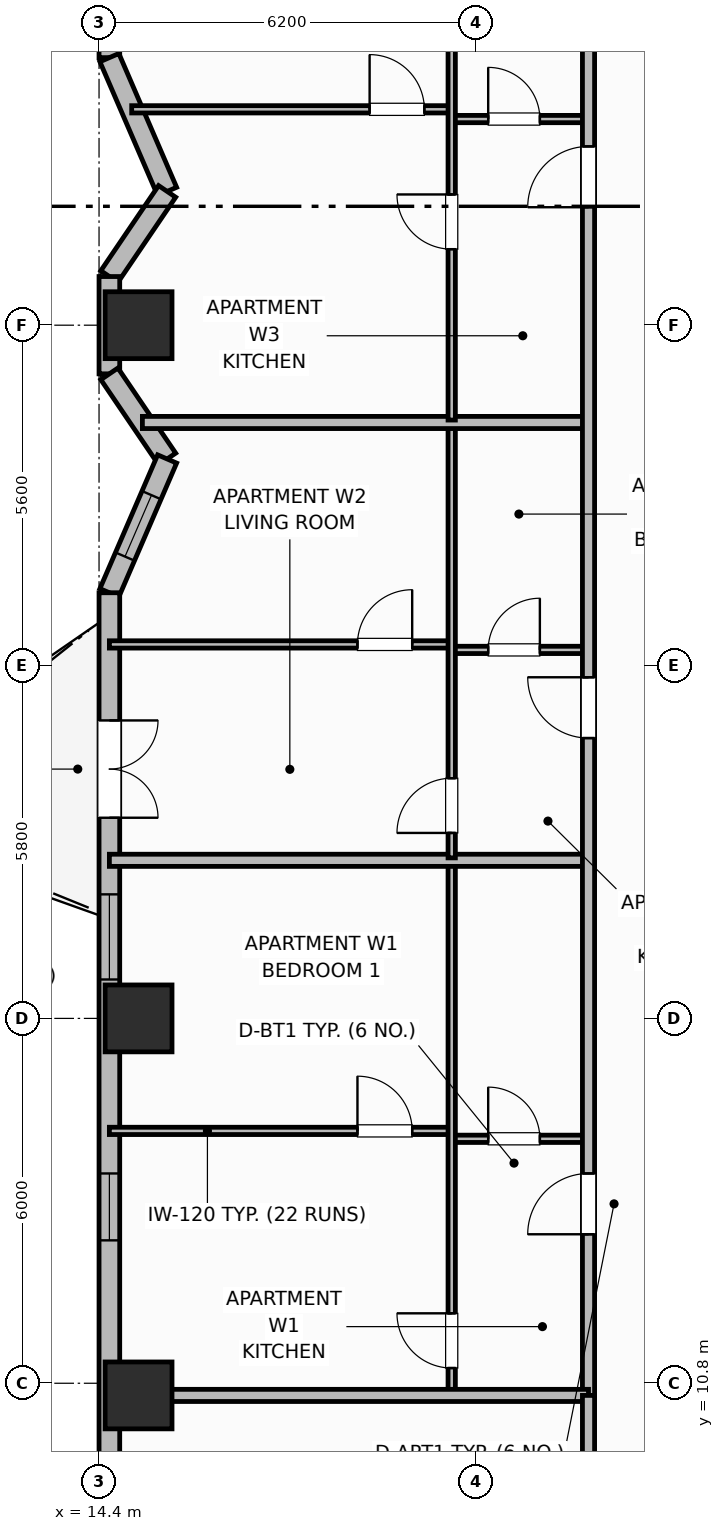
"""IFC4 building model, lengths in metres.
Left out: names, types, materials, properties, quantities, classifications, styles, units other than length and angle.
Written with IfcOpenShell. Run it as: python <this file> out.ifc"""

import sys

from ifc_helpers import new_model, si_unit, direction, frame, frame_2d, origin, origin_2d, place, context, subcontext, project, spatial, rectangle, extrude, element, fill, save


model = new_model("IFC4")
c1 = context("Model", 3, precision=1e-05, world=origin(), true_north=direction((0.0, 1.0)))
c2 = subcontext(c1, "Body", "Model", "MODEL_VIEW")
j1 = project(units=[si_unit("LENGTHUNIT", "METRE"), si_unit("PLANEANGLEUNIT", "RADIAN")], contexts=[c1])
p1 = place(None, origin())
s1 = spatial("IfcSite", under=j1, at=p1, CompositionType="ELEMENT")
p2 = place(p1, origin())
s2 = spatial("IfcBuilding", under=s1, at=p2, CompositionType="ELEMENT")
p3 = place(p2, frame((0.0, 0.0, 95.7)))
s3 = spatial("IfcBuildingStorey", under=s2, at=p3, CompositionType="ELEMENT", Elevation=95.7)
for number, where, z_axis, x_axis in (
    (1, (15.05, 10.6, 0.0), (0.0, 0.0, 1.0), (1.0, 0.0, 0.0)),
    (2, (15.05, 16.8, 0.0), (0.0, 0.0, 1.0), (1.0, 0.0, 0.0)),
    (3, (15.05, 28.2, 0.0), (0.0, 0.0, 1.0), (1.0, 0.0, 0.0)),
):
    element("IfcColumn", number, at=place(p3, frame(where, z_axis=z_axis, x_axis=x_axis)), inside=s3, PredefinedType="COLUMN", context=c2, shape_type="SweptSolid", body=[
        extrude(rectangle(XDim=1.1, YDim=1.1, at=origin_2d()), origin(), (0.0, 0.0, 1.0), 3.7),
    ])
p4 = place(p3, frame((14.57, 47.4, 0.0), z_axis=(0.0, 0.0, 1.0), x_axis=(0.0, -1.0, 0.0)))
e4 = element("IfcWall", 4, at=p4, inside=s3, PredefinedType="SOLIDWALL", context=c2, shape_type="SweptSolid", body=[
    extrude(rectangle(XDim=14.8, YDim=0.34, at=frame_2d((7.4, 0.0))), origin(), (0.0, 0.0, 1.0), 2.7),
])
p5 = place(p4, frame((3.962, 0.0, 0.73)))
e5 = element("IfcOpeningElement", 5, at=p5, cuts=e4, PredefinedType="OPENING", context=c2, shape_type="SweptSolid", body=[
    extrude(rectangle(XDim=1.4, YDim=1.85, at=frame_2d((0.7, 0.925))), frame((0.0, 0.18, 0.0), z_axis=(0.0, -1.0, 0.0), x_axis=(1.0, 0.0, 0.0)), (0.0, 0.0, 1.0), 0.36),
])
p6 = place(p4, frame((11.762, 0.0, 0.73)))
e6 = element("IfcOpeningElement", 6, at=p6, cuts=e4, PredefinedType="OPENING", context=c2, shape_type="SweptSolid", body=[
    extrude(rectangle(XDim=1.4, YDim=1.85, at=frame_2d((0.7, 0.925))), frame((0.0, 0.18, 0.0), z_axis=(0.0, -1.0, 0.0), x_axis=(1.0, 0.0, 0.0)), (0.0, 0.0, 1.0), 0.36),
])
p7 = place(p3, frame((14.57, 32.6, 0.0), z_axis=(0.0, 0.0, 1.0), x_axis=(0.396389181543, -0.918082576218, 0.0)))
e7 = element("IfcWall", 7, at=p7, inside=s3, PredefinedType="SOLIDWALL", context=c2, shape_type="SweptSolid", body=[
    extrude(rectangle(XDim=2.396, YDim=0.34, at=frame_2d((1.198, 0.0))), origin(), (0.0, 0.0, 1.0), 2.7),
])
p8 = place(p3, frame((15.52, 30.4, 0.0), z_axis=(0.0, 0.0, 1.0), x_axis=(-0.561508476251, -0.827470985049, 0.0)))
e8 = element("IfcWall", 8, at=p8, inside=s3, PredefinedType="SOLIDWALL", context=c2, shape_type="SweptSolid", body=[
    extrude(rectangle(XDim=1.692, YDim=0.34, at=frame_2d((0.846, 0.0))), origin(), (0.0, 0.0, 1.0), 2.7),
])
p9 = place(p3, frame((14.57, 29.0, 0.0), z_axis=(0.0, 0.0, 1.0), x_axis=(0.0, -1.0, 0.0)))
e9 = element("IfcWall", 9, at=p9, inside=s3, PredefinedType="SOLIDWALL", context=c2, shape_type="SweptSolid", body=[
    extrude(rectangle(XDim=1.6, YDim=0.34, at=frame_2d((0.8, 0.0))), origin(), (0.0, 0.0, 1.0), 2.7),
])
p10 = place(p3, frame((14.57, 27.4, 0.0), z_axis=(0.0, 0.0, 1.0), x_axis=(0.561508476251, -0.827470985049, 0.0)))
e10 = element("IfcWall", 10, at=p10, inside=s3, PredefinedType="SOLIDWALL", context=c2, shape_type="SweptSolid", body=[
    extrude(rectangle(XDim=1.692, YDim=0.34, at=frame_2d((0.846, 0.0))), origin(), (0.0, 0.0, 1.0), 2.7),
])
p11 = place(p3, frame((15.52, 26.0, 0.0), z_axis=(0.0, 0.0, 1.0), x_axis=(-0.396426258231, -0.918066567186, 0.0)))
e11 = element("IfcWall", 11, at=p11, inside=s3, PredefinedType="SOLIDWALL", context=c2, shape_type="SweptSolid", body=[
    extrude(rectangle(XDim=2.396, YDim=0.34, at=frame_2d((1.198, 0.0))), origin(), (0.0, 0.0, 1.0), 2.7),
])
p12 = place(p11, frame((0.648, 0.0, 0.89)))
e12 = element("IfcOpeningElement", 12, at=p12, cuts=e11, PredefinedType="OPENING", context=c2, shape_type="SweptSolid", body=[
    extrude(rectangle(XDim=1.1, YDim=1.65, at=frame_2d((0.55, 0.825))), frame((0.0, 0.18, 0.0), z_axis=(0.0, -1.0, 0.0), x_axis=(1.0, 0.0, 0.0)), (0.0, 0.0, 1.0), 0.36),
])
p13 = place(p3, frame((14.57, 23.8, 0.0), z_axis=(0.0, 0.0, 1.0), x_axis=(0.0, -1.0, 0.0)))
e13 = element("IfcWall", 13, at=p13, inside=s3, PredefinedType="SOLIDWALL", context=c2, shape_type="SweptSolid", body=[
    extrude(rectangle(XDim=14.8, YDim=0.34, at=frame_2d((7.4, 0.0))), origin(), (0.0, 0.0, 1.0), 2.7),
])
p14 = place(p13, frame((2.1, 0.0, 0.0)))
e14 = element("IfcOpeningElement", 14, at=p14, cuts=e13, PredefinedType="OPENING", context=c2, shape_type="SweptSolid", body=[
    extrude(rectangle(XDim=1.6, YDim=2.1, at=frame_2d((0.8, 1.05))), frame((0.0, 0.18, 0.0), z_axis=(0.0, -1.0, 0.0), x_axis=(1.0, 0.0, 0.0)), (0.0, 0.0, 1.0), 0.36),
])
p15 = place(p13, frame((4.96, 0.0, 0.69)))
e15 = element("IfcOpeningElement", 15, at=p15, cuts=e13, PredefinedType="OPENING", context=c2, shape_type="SweptSolid", body=[
    extrude(rectangle(XDim=1.4, YDim=1.85, at=frame_2d((0.7, 0.925))), frame((0.0, 0.18, 0.0), z_axis=(0.0, -1.0, 0.0), x_axis=(1.0, 0.0, 0.0)), (0.0, 0.0, 1.0), 0.36),
])
p16 = place(p13, frame((9.55, 0.0, 0.93)))
e16 = element("IfcOpeningElement", 16, at=p16, cuts=e13, PredefinedType="OPENING", context=c2, shape_type="SweptSolid", body=[
    extrude(rectangle(XDim=1.1, YDim=1.65, at=frame_2d((0.55, 0.825))), frame((0.0, 0.18, 0.0), z_axis=(0.0, -1.0, 0.0), x_axis=(1.0, 0.0, 0.0)), (0.0, 0.0, 1.0), 0.36),
])
p17 = place(p3, frame((20.2, 14.82, 0.0), z_axis=(0.0, 0.0, 1.0), x_axis=(1.0, 0.0, 0.0)))
e17 = element("IfcWall", 17, at=p17, inside=s3, PredefinedType="PARTITIONING", context=c2, shape_type="SweptSolid", body=[
    extrude(rectangle(XDim=2.25, YDim=0.12, at=frame_2d((1.125, 0.0))), origin(), (0.0, 0.0, 1.0), 2.53),
])
p18 = place(p17, frame((0.6, 0.0, 0.0)))
e18 = element("IfcOpeningElement", 18, at=p18, cuts=e17, PredefinedType="OPENING", context=c2, shape_type="SweptSolid", body=[
    extrude(rectangle(XDim=0.85, YDim=2.1, at=frame_2d((0.425, 1.05))), frame((0.0, 0.07, 0.0), z_axis=(0.0, -1.0, 0.0), x_axis=(1.0, 0.0, 0.0)), (0.0, 0.0, 1.0), 0.14),
])
p19 = place(p3, frame((14.57, 14.95, 0.0), z_axis=(0.0, 0.0, 1.0), x_axis=(1.0, 0.0, 0.0)))
e19 = element("IfcWall", 19, at=p19, inside=s3, PredefinedType="PARTITIONING", context=c2, shape_type="SweptSolid", body=[
    extrude(rectangle(XDim=5.63, YDim=0.12, at=frame_2d((2.815, 0.0))), origin(), (0.0, 0.0, 1.0), 2.53),
])
p20 = place(p19, frame((4.08, 0.0, 0.0)))
e20 = element("IfcOpeningElement", 20, at=p20, cuts=e19, PredefinedType="OPENING", context=c2, shape_type="SweptSolid", body=[
    extrude(rectangle(XDim=0.9, YDim=2.1, at=frame_2d((0.45, 1.05))), frame((0.0, 0.07, 0.0), z_axis=(0.0, -1.0, 0.0), x_axis=(1.0, 0.0, 0.0)), (0.0, 0.0, 1.0), 0.14),
])
p21 = place(p3, frame((20.2, 10.64, 0.0), z_axis=(0.0, 0.0, 1.0), x_axis=(0.0, 1.0, 0.0)))
e21 = element("IfcWall", 21, at=p21, inside=s3, PredefinedType="PARTITIONING", context=c2, shape_type="SweptSolid", body=[
    extrude(rectangle(XDim=8.72, YDim=0.12, at=frame_2d((4.36, 0.0))), origin(), (0.0, 0.0, 1.0), 2.53),
])
p22 = place(p21, frame((0.41, 0.0, 0.0)))
e22 = element("IfcOpeningElement", 22, at=p22, cuts=e21, PredefinedType="OPENING", context=c2, shape_type="SweptSolid", body=[
    extrude(rectangle(XDim=0.9, YDim=2.1, at=frame_2d((0.45, 1.05))), frame((0.0, 0.07, 0.0), z_axis=(0.0, -1.0, 0.0), x_axis=(1.0, 0.0, 0.0)), (0.0, 0.0, 1.0), 0.14),
])
p23 = place(p3, frame((14.57, 19.4, 0.0), z_axis=(0.0, 0.0, 1.0), x_axis=(1.0, 0.0, 0.0)))
e23 = element("IfcWall", 23, at=p23, inside=s3, PredefinedType="PARTITIONING", context=c2, shape_type="SweptSolid", body=[
    extrude(rectangle(XDim=7.88, YDim=0.2, at=frame_2d((3.94, 0.0))), origin(), (0.0, 0.0, 1.0), 2.53),
])
p24 = place(p3, frame((20.2, 22.86, 0.0), z_axis=(0.0, 0.0, 1.0), x_axis=(1.0, 0.0, 0.0)))
e24 = element("IfcWall", 24, at=p24, inside=s3, PredefinedType="PARTITIONING", context=c2, shape_type="SweptSolid", body=[
    extrude(rectangle(XDim=2.25, YDim=0.12, at=frame_2d((1.125, 0.0))), origin(), (0.0, 0.0, 1.0), 2.53),
])
p25 = place(p24, frame((0.6, 0.0, 0.0)))
e25 = element("IfcOpeningElement", 25, at=p25, cuts=e24, PredefinedType="OPENING", context=c2, shape_type="SweptSolid", body=[
    extrude(rectangle(XDim=0.85, YDim=2.1, at=frame_2d((0.425, 1.05))), frame((0.0, 0.07, 0.0), z_axis=(0.0, -1.0, 0.0), x_axis=(1.0, 0.0, 0.0)), (0.0, 0.0, 1.0), 0.14),
])
p26 = place(p3, frame((14.57, 22.95, 0.0), z_axis=(0.0, 0.0, 1.0), x_axis=(1.0, 0.0, 0.0)))
e26 = element("IfcWall", 26, at=p26, inside=s3, PredefinedType="PARTITIONING", context=c2, shape_type="SweptSolid", body=[
    extrude(rectangle(XDim=5.63, YDim=0.12, at=frame_2d((2.815, 0.0))), origin(), (0.0, 0.0, 1.0), 2.53),
])
p27 = place(p26, frame((4.08, 0.0, 0.0)))
e27 = element("IfcOpeningElement", 27, at=p27, cuts=e26, PredefinedType="OPENING", context=c2, shape_type="SweptSolid", body=[
    extrude(rectangle(XDim=0.9, YDim=2.1, at=frame_2d((0.45, 1.05))), frame((0.0, 0.07, 0.0), z_axis=(0.0, -1.0, 0.0), x_axis=(1.0, 0.0, 0.0)), (0.0, 0.0, 1.0), 0.14),
])
p28 = place(p3, frame((20.2, 19.44, 0.0), z_axis=(0.0, 0.0, 1.0), x_axis=(0.0, 1.0, 0.0)))
e28 = element("IfcWall", 28, at=p28, inside=s3, PredefinedType="PARTITIONING", context=c2, shape_type="SweptSolid", body=[
    extrude(rectangle(XDim=7.12, YDim=0.12, at=frame_2d((3.56, 0.0))), origin(), (0.0, 0.0, 1.0), 2.53),
])
p29 = place(p28, frame((0.41, 0.0, 0.0)))
e29 = element("IfcOpeningElement", 29, at=p29, cuts=e28, PredefinedType="OPENING", context=c2, shape_type="SweptSolid", body=[
    extrude(rectangle(XDim=0.9, YDim=2.1, at=frame_2d((0.45, 1.05))), frame((0.0, 0.07, 0.0), z_axis=(0.0, -1.0, 0.0), x_axis=(1.0, 0.0, 0.0)), (0.0, 0.0, 1.0), 0.14),
])
p30 = place(p3, frame((15.113, 26.6, 0.0), z_axis=(0.0, 0.0, 1.0), x_axis=(1.0, 0.0, 0.0)))
e30 = element("IfcWall", 30, at=p30, inside=s3, PredefinedType="PARTITIONING", context=c2, shape_type="SweptSolid", body=[
    extrude(rectangle(XDim=7.337, YDim=0.2, at=frame_2d((3.668, 0.0))), origin(), (0.0, 0.0, 1.0), 2.53),
])
p31 = place(p3, frame((20.2, 31.59, 0.0), z_axis=(0.0, 0.0, 1.0), x_axis=(1.0, 0.0, 0.0)))
e31 = element("IfcWall", 31, at=p31, inside=s3, PredefinedType="PARTITIONING", context=c2, shape_type="SweptSolid", body=[
    extrude(rectangle(XDim=2.25, YDim=0.12, at=frame_2d((1.125, 0.0))), origin(), (0.0, 0.0, 1.0), 2.53),
])
p32 = place(p31, frame((0.6, 0.0, 0.0)))
e32 = element("IfcOpeningElement", 32, at=p32, cuts=e31, PredefinedType="OPENING", context=c2, shape_type="SweptSolid", body=[
    extrude(rectangle(XDim=0.85, YDim=2.1, at=frame_2d((0.425, 1.05))), frame((0.0, 0.07, 0.0), z_axis=(0.0, -1.0, 0.0), x_axis=(1.0, 0.0, 0.0)), (0.0, 0.0, 1.0), 0.14),
])
p33 = place(p3, frame((14.937, 31.75, 0.0), z_axis=(0.0, 0.0, 1.0), x_axis=(1.0, 0.0, 0.0)))
e33 = element("IfcWall", 33, at=p33, inside=s3, PredefinedType="PARTITIONING", context=c2, shape_type="SweptSolid", body=[
    extrude(rectangle(XDim=5.263, YDim=0.12, at=frame_2d((2.631, 0.0))), origin(), (0.0, 0.0, 1.0), 2.53),
])
p34 = place(p33, frame((3.913, 0.0, 0.0)))
e34 = element("IfcOpeningElement", 34, at=p34, cuts=e33, PredefinedType="OPENING", context=c2, shape_type="SweptSolid", body=[
    extrude(rectangle(XDim=0.9, YDim=2.1, at=frame_2d((0.45, 1.05))), frame((0.0, 0.07, 0.0), z_axis=(0.0, -1.0, 0.0), x_axis=(1.0, 0.0, 0.0)), (0.0, 0.0, 1.0), 0.14),
])
p35 = place(p3, frame((20.2, 26.64, 0.0), z_axis=(0.0, 0.0, 1.0), x_axis=(0.0, 1.0, 0.0)))
e35 = element("IfcWall", 35, at=p35, inside=s3, PredefinedType="PARTITIONING", context=c2, shape_type="SweptSolid", body=[
    extrude(rectangle(XDim=10.32, YDim=0.12, at=frame_2d((5.16, 0.0))), origin(), (0.0, 0.0, 1.0), 2.53),
])
p36 = place(p35, frame((2.81, 0.0, 0.0)))
e36 = element("IfcOpeningElement", 36, at=p36, cuts=e35, PredefinedType="OPENING", context=c2, shape_type="SweptSolid", body=[
    extrude(rectangle(XDim=0.9, YDim=2.1, at=frame_2d((0.45, 1.05))), frame((0.0, 0.07, 0.0), z_axis=(0.0, -1.0, 0.0), x_axis=(1.0, 0.0, 0.0)), (0.0, 0.0, 1.0), 0.14),
])
p37 = place(p3, frame((22.45, 10.6, 0.0), z_axis=(0.0, 0.0, 1.0), x_axis=(0.0, 1.0, 0.0)))
e37 = element("IfcWall", 37, at=p37, inside=s3, PredefinedType="PARTITIONING", context=c2, shape_type="SweptSolid", body=[
    extrude(rectangle(XDim=35.2, YDim=0.2, at=frame_2d((17.6, 0.0))), origin(), (0.0, 0.0, 1.0), 2.53),
])
p38 = place(p37, frame((2.65, 0.0, 0.0)))
e38 = element("IfcOpeningElement", 38, at=p38, cuts=e37, PredefinedType="OPENING", context=c2, shape_type="SweptSolid", body=[
    extrude(rectangle(XDim=1.0, YDim=2.15, at=frame_2d((0.5, 1.075))), frame((0.0, 0.11, 0.0), z_axis=(0.0, -1.0, 0.0), x_axis=(1.0, 0.0, 0.0)), (0.0, 0.0, 1.0), 0.22),
])
p39 = place(p37, frame((10.81, 0.0, 0.0)))
e39 = element("IfcOpeningElement", 39, at=p39, cuts=e37, PredefinedType="OPENING", context=c2, shape_type="SweptSolid", body=[
    extrude(rectangle(XDim=1.0, YDim=2.15, at=frame_2d((0.5, 1.075))), frame((0.0, 0.11, 0.0), z_axis=(0.0, -1.0, 0.0), x_axis=(1.0, 0.0, 0.0)), (0.0, 0.0, 1.0), 0.22),
])
p40 = place(p37, frame((19.54, 0.0, 0.0)))
e40 = element("IfcOpeningElement", 40, at=p40, cuts=e37, PredefinedType="OPENING", context=c2, shape_type="SweptSolid", body=[
    extrude(rectangle(XDim=1.0, YDim=2.15, at=frame_2d((0.5, 1.075))), frame((0.0, 0.11, 0.0), z_axis=(0.0, -1.0, 0.0), x_axis=(1.0, 0.0, 0.0)), (0.0, 0.0, 1.0), 0.22),
])
p41 = place(p37, frame((26.95, 0.0, 0.0)))
e41 = element("IfcOpeningElement", 41, at=p41, cuts=e37, PredefinedType="OPENING", context=c2, shape_type="SweptSolid", body=[
    extrude(rectangle(XDim=1.0, YDim=2.15, at=frame_2d((0.5, 1.075))), frame((0.0, 0.11, 0.0), z_axis=(0.0, -1.0, 0.0), x_axis=(1.0, 0.0, 0.0)), (0.0, 0.0, 1.0), 0.22),
])
p42 = place(p3, frame((14.99, 10.6, 0.0), z_axis=(0.0, 0.0, 1.0), x_axis=(1.0, 0.0, 0.0)))
e42 = element("IfcWall", 42, at=p42, inside=s3, PredefinedType="PARTITIONING", context=c2, shape_type="SweptSolid", body=[
    extrude(rectangle(XDim=7.46, YDim=0.2, at=frame_2d((3.73, 0.0))), origin(), (0.0, 0.0, 1.0), 2.53),
])
p43 = place(p3, frame((22.45, 4.97, 0.0), z_axis=(0.0, 0.0, 1.0), x_axis=(0.0, 1.0, 0.0)))
e43 = element("IfcWall", 43, at=p43, inside=s3, PredefinedType="PARTITIONING", context=c2, shape_type="SweptSolid", body=[
    extrude(rectangle(XDim=5.63, YDim=0.2, at=frame_2d((2.815, 0.0))), origin(), (0.0, 0.0, 1.0), 2.53),
])
p44 = place(p12, origin())
e44 = element("IfcWindow", 44, at=p44, inside=s3, PartitioningType="SINGLE_PANEL", PredefinedType="WINDOW", context=c2, shape_type="SweptSolid", body=[
    extrude(rectangle(XDim=1.1, YDim=1.65, at=frame_2d((0.55, 0.825))), frame((0.0, 0.03, 0.0), z_axis=(0.0, -1.0, 0.0), x_axis=(1.0, 0.0, 0.0)), (0.0, 0.0, 1.0), 0.06),
])
fill(e12, e44)
p45 = place(p14, origin())
e45 = element("IfcDoor", 45, at=p45, inside=s3, OperationType="DOUBLE_DOOR_SINGLE_SWING", PredefinedType="DOOR", context=c2, shape_type="SweptSolid", body=[
    extrude(rectangle(XDim=1.6, YDim=2.1, at=frame_2d((0.8, 1.05))), frame((0.0, 0.025, 0.0), z_axis=(0.0, -1.0, 0.0), x_axis=(1.0, 0.0, 0.0)), (0.0, 0.0, 1.0), 0.05),
])
fill(e14, e45)
p46 = place(p15, origin())
e46 = element("IfcWindow", 46, at=p46, inside=s3, PartitioningType="SINGLE_PANEL", PredefinedType="WINDOW", context=c2, shape_type="SweptSolid", body=[
    extrude(rectangle(XDim=1.4, YDim=1.85, at=frame_2d((0.7, 0.925))), frame((0.0, 0.03, 0.0), z_axis=(0.0, -1.0, 0.0), x_axis=(1.0, 0.0, 0.0)), (0.0, 0.0, 1.0), 0.06),
])
fill(e15, e46)
p47 = place(p16, origin())
e47 = element("IfcWindow", 47, at=p47, inside=s3, PartitioningType="SINGLE_PANEL", PredefinedType="WINDOW", context=c2, shape_type="SweptSolid", body=[
    extrude(rectangle(XDim=1.1, YDim=1.65, at=frame_2d((0.55, 0.825))), frame((0.0, 0.03, 0.0), z_axis=(0.0, -1.0, 0.0), x_axis=(1.0, 0.0, 0.0)), (0.0, 0.0, 1.0), 0.06),
])
fill(e16, e47)
p48 = place(p18, origin())
e48 = element("IfcDoor", 48, at=p48, inside=s3, OperationType="SINGLE_SWING_LEFT", PredefinedType="DOOR", context=c2, shape_type="SweptSolid", body=[
    extrude(rectangle(XDim=0.85, YDim=2.1, at=frame_2d((0.425, 1.05))), frame((0.0, 0.025, 0.0), z_axis=(0.0, -1.0, 0.0), x_axis=(1.0, 0.0, 0.0)), (0.0, 0.0, 1.0), 0.05),
])
fill(e18, e48)
p49 = place(p20, origin())
e49 = element("IfcDoor", 49, at=p49, inside=s3, OperationType="SINGLE_SWING_LEFT", PredefinedType="DOOR", context=c2, shape_type="SweptSolid", body=[
    extrude(rectangle(XDim=0.9, YDim=2.1, at=frame_2d((0.45, 1.05))), frame((0.0, 0.025, 0.0), z_axis=(0.0, -1.0, 0.0), x_axis=(1.0, 0.0, 0.0)), (0.0, 0.0, 1.0), 0.05),
])
fill(e20, e49)
p50 = place(p22, origin())
e50 = element("IfcDoor", 50, at=p50, inside=s3, OperationType="SINGLE_SWING_RIGHT", PredefinedType="DOOR", context=c2, shape_type="SweptSolid", body=[
    extrude(rectangle(XDim=0.9, YDim=2.1, at=frame_2d((0.45, 1.05))), frame((0.0, 0.025, 0.0), z_axis=(0.0, -1.0, 0.0), x_axis=(1.0, 0.0, 0.0)), (0.0, 0.0, 1.0), 0.05),
])
fill(e22, e50)
p51 = place(p25, origin())
e51 = element("IfcDoor", 51, at=p51, inside=s3, OperationType="SINGLE_SWING_RIGHT", PredefinedType="DOOR", context=c2, shape_type="SweptSolid", body=[
    extrude(rectangle(XDim=0.85, YDim=2.1, at=frame_2d((0.425, 1.05))), frame((0.0, 0.025, 0.0), z_axis=(0.0, -1.0, 0.0), x_axis=(1.0, 0.0, 0.0)), (0.0, 0.0, 1.0), 0.05),
])
fill(e25, e51)
p52 = place(p27, origin())
e52 = element("IfcDoor", 52, at=p52, inside=s3, OperationType="SINGLE_SWING_RIGHT", PredefinedType="DOOR", context=c2, shape_type="SweptSolid", body=[
    extrude(rectangle(XDim=0.9, YDim=2.1, at=frame_2d((0.45, 1.05))), frame((0.0, 0.025, 0.0), z_axis=(0.0, -1.0, 0.0), x_axis=(1.0, 0.0, 0.0)), (0.0, 0.0, 1.0), 0.05),
])
fill(e27, e52)
p53 = place(p29, origin())
e53 = element("IfcDoor", 53, at=p53, inside=s3, OperationType="SINGLE_SWING_LEFT", PredefinedType="DOOR", context=c2, shape_type="SweptSolid", body=[
    extrude(rectangle(XDim=0.9, YDim=2.1, at=frame_2d((0.45, 1.05))), frame((0.0, 0.025, 0.0), z_axis=(0.0, -1.0, 0.0), x_axis=(1.0, 0.0, 0.0)), (0.0, 0.0, 1.0), 0.05),
])
fill(e29, e53)
p54 = place(p32, origin())
e54 = element("IfcDoor", 54, at=p54, inside=s3, OperationType="SINGLE_SWING_LEFT", PredefinedType="DOOR", context=c2, shape_type="SweptSolid", body=[
    extrude(rectangle(XDim=0.85, YDim=2.1, at=frame_2d((0.425, 1.05))), frame((0.0, 0.025, 0.0), z_axis=(0.0, -1.0, 0.0), x_axis=(1.0, 0.0, 0.0)), (0.0, 0.0, 1.0), 0.05),
])
fill(e32, e54)
p55 = place(p34, origin())
e55 = element("IfcDoor", 55, at=p55, inside=s3, OperationType="SINGLE_SWING_LEFT", PredefinedType="DOOR", context=c2, shape_type="SweptSolid", body=[
    extrude(rectangle(XDim=0.9, YDim=2.1, at=frame_2d((0.45, 1.05))), frame((0.0, 0.025, 0.0), z_axis=(0.0, -1.0, 0.0), x_axis=(1.0, 0.0, 0.0)), (0.0, 0.0, 1.0), 0.05),
])
fill(e34, e55)
p56 = place(p36, origin())
e56 = element("IfcDoor", 56, at=p56, inside=s3, OperationType="SINGLE_SWING_RIGHT", PredefinedType="DOOR", context=c2, shape_type="SweptSolid", body=[
    extrude(rectangle(XDim=0.9, YDim=2.1, at=frame_2d((0.45, 1.05))), frame((0.0, 0.025, 0.0), z_axis=(0.0, -1.0, 0.0), x_axis=(1.0, 0.0, 0.0)), (0.0, 0.0, 1.0), 0.05),
])
fill(e36, e56)
p57 = place(p38, origin())
e57 = element("IfcDoor", 57, at=p57, inside=s3, OperationType="SINGLE_SWING_LEFT", PredefinedType="DOOR", context=c2, shape_type="SweptSolid", body=[
    extrude(rectangle(XDim=1.0, YDim=2.15, at=frame_2d((0.5, 1.075))), frame((0.0, 0.025, 0.0), z_axis=(0.0, -1.0, 0.0), x_axis=(1.0, 0.0, 0.0)), (0.0, 0.0, 1.0), 0.05),
])
fill(e38, e57)
p58 = place(p39, origin())
e58 = element("IfcDoor", 58, at=p58, inside=s3, OperationType="SINGLE_SWING_RIGHT", PredefinedType="DOOR", context=c2, shape_type="SweptSolid", body=[
    extrude(rectangle(XDim=1.0, YDim=2.15, at=frame_2d((0.5, 1.075))), frame((0.0, 0.025, 0.0), z_axis=(0.0, -1.0, 0.0), x_axis=(1.0, 0.0, 0.0)), (0.0, 0.0, 1.0), 0.05),
])
fill(e39, e58)
p59 = place(p40, origin())
e59 = element("IfcDoor", 59, at=p59, inside=s3, OperationType="SINGLE_SWING_LEFT", PredefinedType="DOOR", context=c2, shape_type="SweptSolid", body=[
    extrude(rectangle(XDim=1.0, YDim=2.15, at=frame_2d((0.5, 1.075))), frame((0.0, 0.025, 0.0), z_axis=(0.0, -1.0, 0.0), x_axis=(1.0, 0.0, 0.0)), (0.0, 0.0, 1.0), 0.05),
])
fill(e40, e59)
save(model, sys.argv[1])
